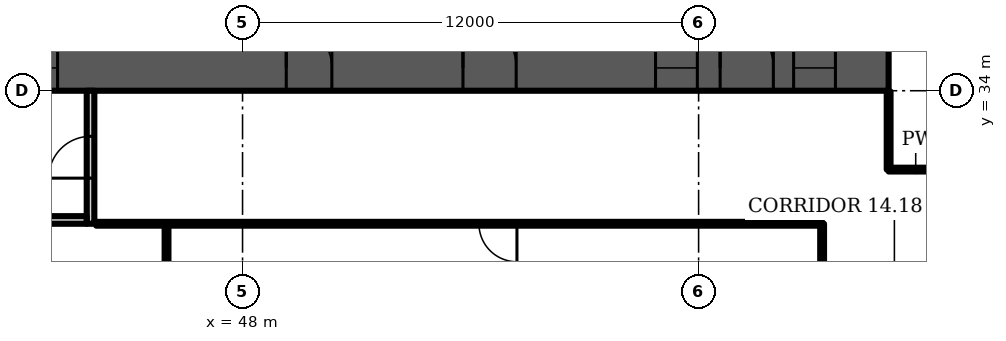
"""IFC4 building model, lengths in metres.
Left out: names, types, materials, properties, quantities, classifications, styles, units other than length and angle.
Written with IfcOpenShell. Run it as: python <this file> out.ifc"""

import sys

from ifc_helpers import new_model, si_unit, direction, frame, frame_2d, origin, place, context, subcontext, project, spatial, rectangle, extrude, element, fill, save


model = new_model("IFC4")
c1 = context("Model", 3, precision=1e-05, world=origin(), true_north=direction((0.0, 1.0)))
c2 = subcontext(c1, "Body", "Model", "MODEL_VIEW")
j1 = project(units=[si_unit("LENGTHUNIT", "METRE"), si_unit("PLANEANGLEUNIT", "RADIAN")], contexts=[c1])
p1 = place(None, origin())
s1 = spatial("IfcSite", under=j1, at=p1, CompositionType="ELEMENT")
p2 = place(p1, origin())
s2 = spatial("IfcBuilding", under=s1, at=p2, CompositionType="ELEMENT")
p3 = place(p2, frame((0.0, 0.0, 70.3)))
s3 = spatial("IfcBuildingStorey", under=s2, at=p3, CompositionType="ELEMENT", Elevation=70.3)
p4 = place(p3, frame((9.0, 34.6, 0.0), z_axis=(0.0, 0.0, 1.0), x_axis=(1.0, 0.0, 0.0)))
e1 = element("IfcWall", 1, at=p4, inside=s3, PredefinedType="SHEAR", context=c2, shape_type="SweptSolid", body=[
    extrude(rectangle(XDim=56.0, YDim=1.2, at=frame_2d((28.0, 0.0))), origin(), (0.0, 0.0, 1.0), 3.6),
])
p5 = place(p4, frame((3.3, 0.0, 0.0)))
e2 = element("IfcOpeningElement", 2, at=p5, cuts=e1, PredefinedType="OPENING", context=c2, shape_type="SweptSolid", body=[
    extrude(rectangle(XDim=1.0, YDim=2.1, at=frame_2d((0.5, 1.05))), frame((0.0, 0.61, 0.0), z_axis=(0.0, -1.0, 0.0), x_axis=(1.0, 0.0, 0.0)), (0.0, 0.0, 1.0), 1.22),
])
p6 = place(p4, frame((7.867, 0.0, 0.0)))
e3 = element("IfcOpeningElement", 3, at=p6, cuts=e1, PredefinedType="OPENING", context=c2, shape_type="SweptSolid", body=[
    extrude(rectangle(XDim=1.1, YDim=2.1, at=frame_2d((0.55, 1.05))), frame((0.0, 0.61, 0.0), z_axis=(0.0, -1.0, 0.0), x_axis=(1.0, 0.0, 0.0)), (0.0, 0.0, 1.0), 1.22),
])
p7 = place(p4, frame((12.033, 0.0, 0.0)))
e4 = element("IfcOpeningElement", 4, at=p7, cuts=e1, PredefinedType="OPENING", context=c2, shape_type="SweptSolid", body=[
    extrude(rectangle(XDim=1.1, YDim=2.1, at=frame_2d((0.55, 1.05))), frame((0.0, 0.61, 0.0), z_axis=(0.0, -1.0, 0.0), x_axis=(1.0, 0.0, 0.0)), (0.0, 0.0, 1.0), 1.22),
])
p8 = place(p4, frame((9.8, 0.0, 0.0)))
e5 = element("IfcOpeningElement", 5, at=p8, cuts=e1, PredefinedType="OPENING", context=c2, shape_type="SweptSolid", body=[
    extrude(rectangle(XDim=1.4, YDim=2.1, at=frame_2d((0.7, 1.05))), frame((0.0, 0.61, 0.0), z_axis=(0.0, -1.0, 0.0), x_axis=(1.0, 0.0, 0.0)), (0.0, 0.0, 1.0), 1.22),
])
p9 = place(p4, frame((14.65, 0.0, 0.0)))
e6 = element("IfcOpeningElement", 6, at=p9, cuts=e1, PredefinedType="OPENING", context=c2, shape_type="SweptSolid", body=[
    extrude(rectangle(XDim=1.2, YDim=2.1, at=frame_2d((0.6, 1.05))), frame((0.0, 0.61, 0.0), z_axis=(0.0, -1.0, 0.0), x_axis=(1.0, 0.0, 0.0)), (0.0, 0.0, 1.0), 1.22),
])
p10 = place(p4, frame((21.867, 0.0, 0.0)))
e7 = element("IfcOpeningElement", 7, at=p10, cuts=e1, PredefinedType="OPENING", context=c2, shape_type="SweptSolid", body=[
    extrude(rectangle(XDim=1.1, YDim=2.1, at=frame_2d((0.55, 1.05))), frame((0.0, 0.61, 0.0), z_axis=(0.0, -1.0, 0.0), x_axis=(1.0, 0.0, 0.0)), (0.0, 0.0, 1.0), 1.22),
])
p11 = place(p4, frame((26.033, 0.0, 0.0)))
e8 = element("IfcOpeningElement", 8, at=p11, cuts=e1, PredefinedType="OPENING", context=c2, shape_type="SweptSolid", body=[
    extrude(rectangle(XDim=1.1, YDim=2.1, at=frame_2d((0.55, 1.05))), frame((0.0, 0.61, 0.0), z_axis=(0.0, -1.0, 0.0), x_axis=(1.0, 0.0, 0.0)), (0.0, 0.0, 1.0), 1.22),
])
p12 = place(p4, frame((23.8, 0.0, 0.0)))
e9 = element("IfcOpeningElement", 9, at=p12, cuts=e1, PredefinedType="OPENING", context=c2, shape_type="SweptSolid", body=[
    extrude(rectangle(XDim=1.4, YDim=2.1, at=frame_2d((0.7, 1.05))), frame((0.0, 0.61, 0.0), z_axis=(0.0, -1.0, 0.0), x_axis=(1.0, 0.0, 0.0)), (0.0, 0.0, 1.0), 1.22),
])
p13 = place(p4, frame((28.867, 0.0, 0.0)))
e10 = element("IfcOpeningElement", 10, at=p13, cuts=e1, PredefinedType="OPENING", context=c2, shape_type="SweptSolid", body=[
    extrude(rectangle(XDim=1.1, YDim=2.1, at=frame_2d((0.55, 1.05))), frame((0.0, 0.61, 0.0), z_axis=(0.0, -1.0, 0.0), x_axis=(1.0, 0.0, 0.0)), (0.0, 0.0, 1.0), 1.22),
])
p14 = place(p4, frame((33.033, 0.0, 0.0)))
e11 = element("IfcOpeningElement", 11, at=p14, cuts=e1, PredefinedType="OPENING", context=c2, shape_type="SweptSolid", body=[
    extrude(rectangle(XDim=1.1, YDim=2.1, at=frame_2d((0.55, 1.05))), frame((0.0, 0.61, 0.0), z_axis=(0.0, -1.0, 0.0), x_axis=(1.0, 0.0, 0.0)), (0.0, 0.0, 1.0), 1.22),
])
p15 = place(p4, frame((40.15, 0.0, 0.0)))
e12 = element("IfcOpeningElement", 12, at=p15, cuts=e1, PredefinedType="OPENING", context=c2, shape_type="SweptSolid", body=[
    extrude(rectangle(XDim=1.2, YDim=2.1, at=frame_2d((0.6, 1.05))), frame((0.0, 0.61, 0.0), z_axis=(0.0, -1.0, 0.0), x_axis=(1.0, 0.0, 0.0)), (0.0, 0.0, 1.0), 1.22),
])
p16 = place(p4, frame((44.8, 0.0, 0.0)))
e13 = element("IfcOpeningElement", 13, at=p16, cuts=e1, PredefinedType="OPENING", context=c2, shape_type="SweptSolid", body=[
    extrude(rectangle(XDim=1.4, YDim=2.1, at=frame_2d((0.7, 1.05))), frame((0.0, 0.61, 0.0), z_axis=(0.0, -1.0, 0.0), x_axis=(1.0, 0.0, 0.0)), (0.0, 0.0, 1.0), 1.22),
])
p17 = place(p4, frame((49.867, 0.0, 0.0)))
e14 = element("IfcOpeningElement", 14, at=p17, cuts=e1, PredefinedType="OPENING", context=c2, shape_type="SweptSolid", body=[
    extrude(rectangle(XDim=1.1, YDim=2.1, at=frame_2d((0.55, 1.05))), frame((0.0, 0.61, 0.0), z_axis=(0.0, -1.0, 0.0), x_axis=(1.0, 0.0, 0.0)), (0.0, 0.0, 1.0), 1.22),
])
p18 = place(p4, frame((53.5, 0.0, 0.0)))
e15 = element("IfcOpeningElement", 15, at=p18, cuts=e1, PredefinedType="OPENING", context=c2, shape_type="SweptSolid", body=[
    extrude(rectangle(XDim=1.1, YDim=2.1, at=frame_2d((0.55, 1.05))), frame((0.0, 0.61, 0.0), z_axis=(0.0, -1.0, 0.0), x_axis=(1.0, 0.0, 0.0)), (0.0, 0.0, 1.0), 1.22),
])
p19 = place(p4, frame((51.567, 0.0, 0.0)))
e16 = element("IfcOpeningElement", 16, at=p19, cuts=e1, PredefinedType="OPENING", context=c2, shape_type="SweptSolid", body=[
    extrude(rectangle(XDim=1.4, YDim=2.1, at=frame_2d((0.7, 1.05))), frame((0.0, 0.61, 0.0), z_axis=(0.0, -1.0, 0.0), x_axis=(1.0, 0.0, 0.0)), (0.0, 0.0, 1.0), 1.22),
])
p20 = place(p3, frame((44.0, 30.5, 0.0), z_axis=(0.0, 0.0, 1.0), x_axis=(0.0, 1.0, 0.0)))
e17 = element("IfcWall", 17, at=p20, inside=s3, PredefinedType="PARTITIONING", context=c2, shape_type="SweptSolid", body=[
    extrude(rectangle(XDim=3.5, YDim=0.2, at=frame_2d((1.75, 0.0))), origin(), (0.0, 0.0, 1.0), 3.2),
])
p21 = place(p20, frame((1.2, 0.0, 0.0)))
e18 = element("IfcOpeningElement", 18, at=p21, cuts=e17, PredefinedType="OPENING", context=c2, shape_type="SweptSolid", body=[
    extrude(rectangle(XDim=1.1, YDim=2.1, at=frame_2d((0.55, 1.05))), frame((0.0, 0.11, 0.0), z_axis=(0.0, -1.0, 0.0), x_axis=(1.0, 0.0, 0.0)), (0.0, 0.0, 1.0), 0.22),
])
p22 = place(p3, frame((41.1, 30.6, 0.0), z_axis=(0.0, 0.0, 1.0), x_axis=(1.0, 0.0, 0.0)))
e19 = element("IfcWall", 19, at=p22, inside=s3, PredefinedType="PARTITIONING", context=c2, shape_type="SweptSolid", body=[
    extrude(rectangle(XDim=2.8, YDim=0.2, at=frame_2d((1.4, 0.0))), origin(), (0.0, 0.0, 1.0), 3.2),
])
p23 = place(p3, frame((46.0, -4.004, 0.0), z_axis=(0.0, 0.0, 1.0), x_axis=(0.0, 1.0, 0.0)))
e20 = element("IfcWall", 20, at=p23, inside=s3, PredefinedType="PARTITIONING", context=c2, shape_type="SweptSolid", body=[
    extrude(rectangle(XDim=34.504, YDim=0.1, at=frame_2d((17.252, 0.0))), origin(), (0.0, 0.0, 1.0), 3.2),
])
p24 = place(p3, frame((63.25, -2.495, 0.0), z_axis=(0.0, 0.0, 1.0), x_axis=(0.0, 1.0, 0.0)))
e21 = element("IfcWall", 21, at=p24, inside=s3, PredefinedType="PARTITIONING", context=c2, shape_type="SweptSolid", body=[
    extrude(rectangle(XDim=32.995, YDim=0.1, at=frame_2d((16.498, 0.0))), origin(), (0.0, 0.0, 1.0), 2.58),
])
p25 = place(p3, frame((65.0, 31.925, 0.0), z_axis=(0.0, 0.0, 1.0), x_axis=(0.0, 1.0, 0.0)))
e22 = element("IfcWall", 22, at=p25, inside=s3, PredefinedType="PARTITIONING", context=c2, shape_type="SweptSolid", body=[
    extrude(rectangle(XDim=2.055, YDim=0.1, at=frame_2d((1.027, 0.0))), origin(), (0.0, 0.0, 1.0), 3.2),
])
p26 = place(p3, frame((65.0, 31.925, 0.0), z_axis=(0.0, 0.0, 1.0), x_axis=(1.0, 0.0, 0.0)))
e23 = element("IfcWall", 23, at=p26, inside=s3, PredefinedType="PARTITIONING", context=c2, shape_type="SweptSolid", body=[
    extrude(rectangle(XDim=1.425, YDim=0.1, at=frame_2d((0.712, 0.0))), origin(), (0.0, 0.0, 1.0), 3.2),
])
p27 = place(p3, frame((65.9, 27.435, 0.0), z_axis=(0.0, 0.0, 1.0), x_axis=(0.178584, 0.983924, 0.0)))
e24 = element("IfcWall", 24, at=p27, inside=s3, PredefinedType="PARTITIONING", context=c2, shape_type="SweptSolid", body=[
    extrude(rectangle(XDim=2.353, YDim=0.1, at=frame_2d((1.176, 0.0))), origin(), (0.0, 0.0, 1.0), 3.2),
])
p28 = place(p3, frame((44.15, 30.5, 0.0), z_axis=(0.0, 0.0, 1.0), x_axis=(1.0, 0.0, 0.0)))
e25 = element("IfcWall", 25, at=p28, inside=s3, PredefinedType="PARTITIONING", context=c2, shape_type="SweptSolid", body=[
    extrude(rectangle(XDim=19.1, YDim=0.1, at=frame_2d((9.55, 0.0))), origin(), (0.0, 0.0, 1.0), 3.2),
])
p29 = place(p28, frame((10.07, 0.0, 0.0)))
e26 = element("IfcOpeningElement", 26, at=p29, cuts=e25, PredefinedType="OPENING", context=c2, shape_type="SweptSolid", body=[
    extrude(rectangle(XDim=1.0, YDim=2.1, at=frame_2d((0.5, 1.05))), frame((0.0, 0.06, 0.0), z_axis=(0.0, -1.0, 0.0), x_axis=(1.0, 0.0, 0.0)), (0.0, 0.0, 1.0), 0.12),
])
p30 = place(p14, origin())
e27 = element("IfcDoor", 27, at=p30, inside=s3, OperationType="DOUBLE_DOOR_SLIDING", PredefinedType="DOOR", context=c2, shape_type="SweptSolid", body=[
    extrude(rectangle(XDim=1.1, YDim=2.1, at=frame_2d((0.55, 1.05))), frame((0.0, 0.025, 0.0), z_axis=(0.0, -1.0, 0.0), x_axis=(1.0, 0.0, 0.0)), (0.0, 0.0, 1.0), 0.05),
])
fill(e11, e27)
p31 = place(p15, origin())
e28 = element("IfcDoor", 28, at=p31, inside=s3, OperationType="SINGLE_SWING_LEFT", PredefinedType="DOOR", context=c2, shape_type="SweptSolid", body=[
    extrude(rectangle(XDim=1.2, YDim=2.1, at=frame_2d((0.6, 1.05))), frame((0.0, 0.025, 0.0), z_axis=(0.0, -1.0, 0.0), x_axis=(1.0, 0.0, 0.0)), (0.0, 0.0, 1.0), 0.05),
])
fill(e12, e28)
p32 = place(p16, origin())
e29 = element("IfcDoor", 29, at=p32, inside=s3, OperationType="DOUBLE_DOOR_SINGLE_SWING", PredefinedType="DOOR", context=c2, shape_type="SweptSolid", body=[
    extrude(rectangle(XDim=1.4, YDim=2.1, at=frame_2d((0.7, 1.05))), frame((0.0, 0.025, 0.0), z_axis=(0.0, -1.0, 0.0), x_axis=(1.0, 0.0, 0.0)), (0.0, 0.0, 1.0), 0.05),
])
fill(e13, e29)
p33 = place(p17, origin())
e30 = element("IfcDoor", 30, at=p33, inside=s3, OperationType="DOUBLE_DOOR_SLIDING", PredefinedType="DOOR", context=c2, shape_type="SweptSolid", body=[
    extrude(rectangle(XDim=1.1, YDim=2.1, at=frame_2d((0.55, 1.05))), frame((0.0, 0.025, 0.0), z_axis=(0.0, -1.0, 0.0), x_axis=(1.0, 0.0, 0.0)), (0.0, 0.0, 1.0), 0.05),
])
fill(e14, e30)
p34 = place(p18, origin())
e31 = element("IfcDoor", 31, at=p34, inside=s3, OperationType="DOUBLE_DOOR_SLIDING", PredefinedType="DOOR", context=c2, shape_type="SweptSolid", body=[
    extrude(rectangle(XDim=1.1, YDim=2.1, at=frame_2d((0.55, 1.05))), frame((0.0, 0.025, 0.0), z_axis=(0.0, -1.0, 0.0), x_axis=(1.0, 0.0, 0.0)), (0.0, 0.0, 1.0), 0.05),
])
fill(e15, e31)
p35 = place(p19, origin())
e32 = element("IfcDoor", 32, at=p35, inside=s3, OperationType="DOUBLE_DOOR_SINGLE_SWING", PredefinedType="DOOR", context=c2, shape_type="SweptSolid", body=[
    extrude(rectangle(XDim=1.4, YDim=2.1, at=frame_2d((0.7, 1.05))), frame((0.0, 0.025, 0.0), z_axis=(0.0, -1.0, 0.0), x_axis=(1.0, 0.0, 0.0)), (0.0, 0.0, 1.0), 0.05),
])
fill(e16, e32)
p36 = place(p21, origin())
e33 = element("IfcDoor", 33, at=p36, inside=s3, OperationType="SINGLE_SWING_LEFT", PredefinedType="DOOR", context=c2, shape_type="SweptSolid", body=[
    extrude(rectangle(XDim=1.1, YDim=2.1, at=frame_2d((0.55, 1.05))), frame((0.0, 0.025, 0.0), z_axis=(0.0, -1.0, 0.0), x_axis=(1.0, 0.0, 0.0)), (0.0, 0.0, 1.0), 0.05),
])
fill(e18, e33)
p37 = place(p29, origin())
e34 = element("IfcDoor", 34, at=p37, inside=s3, OperationType="SINGLE_SWING_RIGHT", PredefinedType="DOOR", context=c2, shape_type="SweptSolid", body=[
    extrude(rectangle(XDim=1.0, YDim=2.1, at=frame_2d((0.5, 1.05))), frame((0.0, 0.025, 0.0), z_axis=(0.0, -1.0, 0.0), x_axis=(1.0, 0.0, 0.0)), (0.0, 0.0, 1.0), 0.05),
])
fill(e26, e34)
save(model, sys.argv[1])
